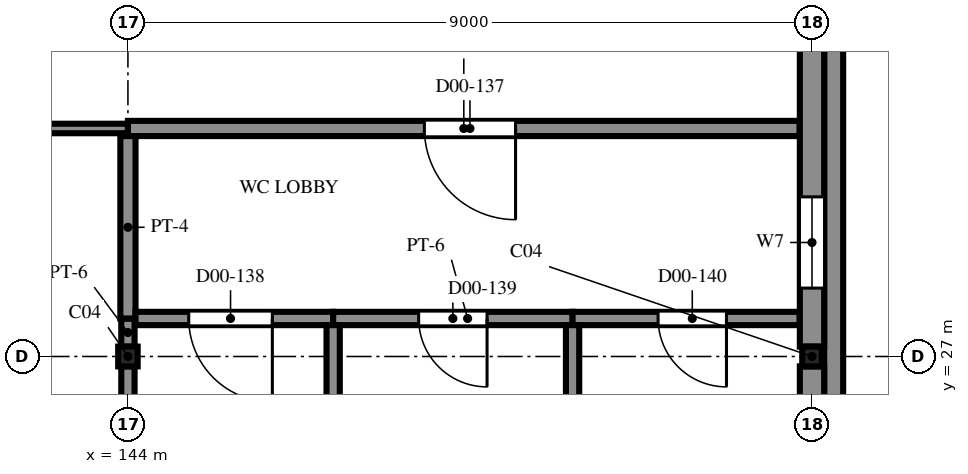
"""IFC4 building model, lengths in metres.
Left out: names, types, materials, properties, quantities, classifications, styles, units other than length and angle.
Written with IfcOpenShell. Run it as: python <this file> out.ifc"""

import sys

from ifc_helpers import new_model, si_unit, direction, frame, frame_2d, origin, origin_2d, place, context, subcontext, project, spatial, polyline, rectangle, i_section, outline, extrude, element, fill, save


model = new_model("IFC4")
c1 = context("Model", 3, precision=1e-05, world=origin(), true_north=direction((0.0, 1.0)))
c2 = subcontext(c1, "Body", "Model", "MODEL_VIEW")
j1 = project(units=[si_unit("LENGTHUNIT", "METRE"), si_unit("PLANEANGLEUNIT", "RADIAN")], contexts=[c1])
p1 = place(None, origin())
s1 = spatial("IfcSite", under=j1, at=p1, CompositionType="ELEMENT")
p2 = place(p1, origin())
s2 = spatial("IfcBuilding", under=s1, at=p2, CompositionType="ELEMENT")
p3 = place(p2, origin())
s3 = spatial("IfcBuildingStorey", under=s2, at=p3, CompositionType="ELEMENT", Elevation=0.0)
for number, where, z_axis, x_axis in (
    (1, (144.0, 27.0, -2.1), (0.0, 0.0, 1.0), (1.0, 0.0, 0.0)),
    (2, (153.0, 27.0, -2.1), (0.0, 0.0, 1.0), (1.0, 0.0, 0.0)),
):
    element("IfcColumn", number, at=place(p3, frame(where, z_axis=z_axis, x_axis=x_axis)), inside=s3, PredefinedType="COLUMN", context=c2, shape_type="SweptSolid", body=[
        extrude(i_section(OverallWidth=0.256, OverallDepth=0.26, WebThickness=0.01, FlangeThickness=0.017, FilletRadius=0.013, at=origin_2d()), origin(), (0.0, 0.0, 1.0), 9.6),
    ])
p4 = place(p3, frame((153.0, 18.13, 0.0), z_axis=(0.0, 0.0, 1.0), x_axis=(0.0, 1.0, 0.0)))
e3 = element("IfcWall", 3, at=p4, inside=s3, PredefinedType="SOLIDWALL", context=c2, shape_type="SweptSolid", body=[
    extrude(rectangle(XDim=8.74, YDim=0.32, at=frame_2d((4.37, 0.0))), origin(), (0.0, 0.0, 1.0), 6.767),
])
p5 = place(p4, frame((0.77, 0.0, 0.9)))
e4 = element("IfcOpeningElement", 4, at=p5, cuts=e3, PredefinedType="OPENING", context=c2, shape_type="SweptSolid", body=[
    extrude(rectangle(XDim=1.2, YDim=2.7, at=frame_2d((0.6, 1.35))), frame((0.0, 0.17, 0.0), z_axis=(0.0, -1.0, 0.0), x_axis=(1.0, 0.0, 0.0)), (0.0, 0.0, 1.0), 0.34),
])
p6 = place(p4, frame((3.77, 0.0, 0.9)))
e5 = element("IfcOpeningElement", 5, at=p6, cuts=e3, PredefinedType="OPENING", context=c2, shape_type="SweptSolid", body=[
    extrude(rectangle(XDim=1.2, YDim=2.7, at=frame_2d((0.6, 1.35))), frame((0.0, 0.17, 0.0), z_axis=(0.0, -1.0, 0.0), x_axis=(1.0, 0.0, 0.0)), (0.0, 0.0, 1.0), 0.34),
])
p7 = place(p4, frame((6.77, 0.0, 0.9)))
e6 = element("IfcOpeningElement", 6, at=p7, cuts=e3, PredefinedType="OPENING", context=c2, shape_type="SweptSolid", body=[
    extrude(rectangle(XDim=1.2, YDim=2.7, at=frame_2d((0.6, 1.35))), frame((0.0, 0.17, 0.0), z_axis=(0.0, -1.0, 0.0), x_axis=(1.0, 0.0, 0.0)), (0.0, 0.0, 1.0), 0.34),
])
p8 = place(p3, frame((153.0, 27.13, 0.0), z_axis=(0.0, 0.0, 1.0), x_axis=(0.0, 1.0, 0.0)))
e7 = element("IfcWall", 7, at=p8, inside=s3, PredefinedType="SOLIDWALL", context=c2, shape_type="SweptSolid", body=[
    extrude(rectangle(XDim=8.616, YDim=0.32, at=frame_2d((4.308, 0.0))), origin(), (0.0, 0.0, 1.0), 6.767),
])
p9 = place(p8, frame((4.97, 0.0, 0.0)))
e8 = element("IfcOpeningElement", 8, at=p9, cuts=e7, PredefinedType="OPENING", context=c2, shape_type="SweptSolid", body=[
    extrude(rectangle(XDim=1.8, YDim=2.1, at=frame_2d((0.9, 1.05))), frame((0.0, 0.17, 0.0), z_axis=(0.0, -1.0, 0.0), x_axis=(1.0, 0.0, 0.0)), (0.0, 0.0, 1.0), 0.34),
])
p10 = place(p8, frame((5.27, 0.0, 2.55)))
e9 = element("IfcOpeningElement", 9, at=p10, cuts=e7, PredefinedType="OPENING", context=c2, shape_type="SweptSolid", body=[
    extrude(rectangle(XDim=1.2, YDim=0.6, at=frame_2d((0.6, 0.3))), frame((0.0, 0.17, 0.0), z_axis=(0.0, -1.0, 0.0), x_axis=(1.0, 0.0, 0.0)), (0.0, 0.0, 1.0), 0.34),
])
p11 = place(p8, frame((0.77, 0.0, 0.9)))
e10 = element("IfcOpeningElement", 10, at=p11, cuts=e7, PredefinedType="OPENING", context=c2, shape_type="SweptSolid", body=[
    extrude(rectangle(XDim=1.2, YDim=2.7, at=frame_2d((0.6, 1.35))), frame((0.0, 0.17, 0.0), z_axis=(0.0, -1.0, 0.0), x_axis=(1.0, 0.0, 0.0)), (0.0, 0.0, 1.0), 0.34),
])
p12 = place(p3, frame((153.285, 8.73, 0.0), z_axis=(0.0, 0.0, 1.0), x_axis=(0.0, 1.0, 0.0)))
e11 = element("IfcWall", 11, at=p12, inside=s3, PredefinedType="SOLIDWALL", context=c2, shape_type="SweptSolid", body=[
    extrude(outline(polyline([(0.0, 0.0), (23.22, 0.0), (23.22, 6.767), (0.0, 6.767), (0.0, 0.0)]), holes=[polyline([(1.05, 3.852), (1.17, 4.068), (1.275, 4.122), (1.365, 4.266), (1.56, 4.41), (1.77, 4.5), (1.98, 4.41), (2.175, 4.266), (2.265, 4.122), (2.37, 4.068), (2.49, 3.852), (2.52, 3.6), (2.52, 0.75), (1.02, 0.75), (1.02, 3.6), (1.05, 3.852)]), polyline([(4.17, 4.068), (4.275, 4.122), (4.365, 4.266), (4.56, 4.41), (4.77, 4.5), (4.98, 4.41), (5.175, 4.266), (5.265, 4.122), (5.37, 4.068), (5.49, 3.852), (5.52, 3.6), (5.52, 0.75), (4.02, 0.75), (4.02, 3.6), (4.05, 3.852), (4.17, 4.068)]), polyline([(7.17, 4.068), (7.275, 4.122), (7.365, 4.266), (7.56, 4.41), (7.77, 4.5), (7.98, 4.41), (8.175, 4.266), (8.265, 4.122), (8.37, 4.068), (8.49, 3.852), (8.52, 3.6), (8.52, 0.75), (7.02, 0.75), (7.02, 3.6), (7.05, 3.852), (7.17, 4.068)]), polyline([(10.17, 4.068), (10.275, 4.122), (10.365, 4.266), (10.56, 4.41), (10.77, 4.5), (10.98, 4.41), (11.175, 4.266), (11.265, 4.122), (11.37, 4.068), (11.49, 3.852), (11.52, 3.6), (11.52, 0.75), (10.02, 0.75), (10.02, 3.6), (10.05, 3.852), (10.17, 4.068)]), polyline([(13.17, 4.068), (13.275, 4.122), (13.365, 4.266), (13.56, 4.41), (13.77, 4.5), (13.98, 4.41), (14.175, 4.266), (14.265, 4.122), (14.37, 4.068), (14.49, 3.852), (14.52, 3.6), (14.52, 0.75), (13.02, 0.75), (13.02, 3.6), (13.05, 3.852), (13.17, 4.068)]), polyline([(16.17, 4.068), (16.275, 4.122), (16.365, 4.266), (16.56, 4.41), (16.77, 4.5), (16.98, 4.41), (17.175, 4.266), (17.265, 4.122), (17.37, 4.068), (17.49, 3.852), (17.52, 3.6), (17.52, 0.75), (16.02, 0.75), (16.02, 3.6), (16.05, 3.852), (16.17, 4.068)]), polyline([(19.17, 4.068), (19.275, 4.122), (19.365, 4.266), (19.56, 4.41), (19.77, 4.5), (19.98, 4.41), (20.175, 4.266), (20.265, 4.122), (20.37, 4.068), (20.49, 3.852), (20.52, 3.6), (20.52, 0.75), (19.02, 0.75), (19.02, 3.6), (19.05, 3.852), (19.17, 4.068)])]), frame((0.0, 0.125, 0.0), z_axis=(0.0, -1.0, 0.0), x_axis=(1.0, 0.0, 0.0)), (0.0, 0.0, 1.0), 0.25),
])
p13 = place(p3, frame((144.0, 30.0, 0.0), z_axis=(0.0, 0.0, 1.0), x_axis=(-1.0, 0.0, 0.0)))
e12 = element("IfcWall", 12, at=p13, inside=s3, PredefinedType="PARTITIONING", context=c2, shape_type="SweptSolid", body=[
    extrude(rectangle(XDim=9.0, YDim=0.125, at=frame_2d((4.5, 0.0))), origin(), (0.0, 0.0, 1.0), 6.757),
])
p14 = place(p13, frame((3.5, 0.0, 0.0)))
e13 = element("IfcOpeningElement", 13, at=p14, cuts=e12, PredefinedType="OPENING", context=c2, shape_type="SweptSolid", body=[
    extrude(rectangle(XDim=2.0, YDim=2.4, at=frame_2d((1.0, 1.2))), frame((0.0, 0.073, 0.0), z_axis=(0.0, -1.0, 0.0), x_axis=(1.0, 0.0, 0.0)), (0.0, 0.0, 1.0), 0.145),
])
p15 = place(p3, frame((152.838, 30.0, 0.0), z_axis=(0.0, 0.0, 1.0), x_axis=(-1.0, 0.0, 0.0)))
e14 = element("IfcWall", 14, at=p15, inside=s3, PredefinedType="PARTITIONING", context=c2, shape_type="SweptSolid", body=[
    extrude(rectangle(XDim=8.838, YDim=0.2, at=frame_2d((4.419, 0.0))), origin(), (0.0, 0.0, 1.0), 6.6),
])
p16 = place(p15, frame((3.738, 0.0, 0.0)))
e15 = element("IfcOpeningElement", 15, at=p16, cuts=e14, PredefinedType="OPENING", context=c2, shape_type="SweptSolid", body=[
    extrude(rectangle(XDim=1.2, YDim=2.1, at=frame_2d((0.6, 1.05))), frame((0.0, 0.11, 0.0), z_axis=(0.0, -1.0, 0.0), x_axis=(1.0, 0.0, 0.0)), (0.0, 0.0, 1.0), 0.22),
])
p17 = place(p3, frame((144.0, 27.5, 0.0), z_axis=(0.0, 0.0, 1.0), x_axis=(0.0, -1.0, 0.0)))
e16 = element("IfcWall", 16, at=p17, inside=s3, PredefinedType="PARTITIONING", context=c2, shape_type="SweptSolid", body=[
    extrude(rectangle(XDim=0.37, YDim=0.175, at=frame_2d((0.185, 0.0))), origin(), (0.0, 0.0, 1.0), 6.459),
])
p18 = place(p3, frame((144.0, 26.87, 0.0), z_axis=(0.0, 0.0, 1.0), x_axis=(0.0, -1.0, 0.0)))
e17 = element("IfcWall", 17, at=p18, inside=s3, PredefinedType="PARTITIONING", context=c2, shape_type="SweptSolid", body=[
    extrude(rectangle(XDim=5.782, YDim=0.175, at=frame_2d((2.891, 0.0))), origin(), (0.0, 0.0, 1.0), 6.459),
])
p19 = place(p3, frame((144.0, 29.9, 0.0), z_axis=(0.0, 0.0, 1.0), x_axis=(0.0, -1.0, 0.0)))
e18 = element("IfcWall", 18, at=p19, inside=s3, PredefinedType="PARTITIONING", context=c2, shape_type="SweptSolid", body=[
    extrude(rectangle(XDim=2.4, YDim=0.2, at=frame_2d((1.2, 0.0))), origin(), (0.0, 0.0, 1.0), 6.6),
])
p20 = place(p3, frame((146.7, 27.5, 0.0), z_axis=(0.0, 0.0, 1.0), x_axis=(-1.0, 0.0, 0.0)))
e19 = element("IfcWall", 19, at=p20, inside=s3, PredefinedType="PARTITIONING", context=c2, shape_type="SweptSolid", body=[
    extrude(rectangle(XDim=2.6, YDim=0.175, at=frame_2d((1.3, 0.0))), origin(), (0.0, 0.0, 1.0), 6.459),
])
p21 = place(p20, frame((0.8, 0.0, 0.0)))
e20 = element("IfcOpeningElement", 20, at=p21, cuts=e19, PredefinedType="OPENING", context=c2, shape_type="SweptSolid", body=[
    extrude(rectangle(XDim=1.1, YDim=2.1, at=frame_2d((0.55, 1.05))), frame((0.0, 0.097, 0.0), z_axis=(0.0, -1.0, 0.0), x_axis=(1.0, 0.0, 0.0)), (0.0, 0.0, 1.0), 0.195),
])
p22 = place(p3, frame((149.85, 27.5, 0.0), z_axis=(0.0, 0.0, 1.0), x_axis=(-1.0, 0.0, 0.0)))
e21 = element("IfcWall", 21, at=p22, inside=s3, PredefinedType="PARTITIONING", context=c2, shape_type="SweptSolid", body=[
    extrude(rectangle(XDim=3.15, YDim=0.175, at=frame_2d((1.575, 0.0))), origin(), (0.0, 0.0, 1.0), 6.459),
])
p23 = place(p22, frame((1.125, 0.0, 0.0)))
e22 = element("IfcOpeningElement", 22, at=p23, cuts=e21, PredefinedType="OPENING", context=c2, shape_type="SweptSolid", body=[
    extrude(rectangle(XDim=0.9, YDim=2.1, at=frame_2d((0.45, 1.05))), frame((0.0, 0.097, 0.0), z_axis=(0.0, -1.0, 0.0), x_axis=(1.0, 0.0, 0.0)), (0.0, 0.0, 1.0), 0.195),
])
p24 = place(p3, frame((152.838, 27.5, 0.0), z_axis=(0.0, 0.0, 1.0), x_axis=(-1.0, 0.0, 0.0)))
e23 = element("IfcWall", 23, at=p24, inside=s3, PredefinedType="PARTITIONING", context=c2, shape_type="SweptSolid", body=[
    extrude(rectangle(XDim=2.988, YDim=0.175, at=frame_2d((1.494, 0.0))), origin(), (0.0, 0.0, 1.0), 6.459),
])
p25 = place(p24, frame((0.963, 0.0, 0.0)))
e24 = element("IfcOpeningElement", 24, at=p25, cuts=e23, PredefinedType="OPENING", context=c2, shape_type="SweptSolid", body=[
    extrude(rectangle(XDim=0.9, YDim=2.1, at=frame_2d((0.45, 1.05))), frame((0.0, 0.097, 0.0), z_axis=(0.0, -1.0, 0.0), x_axis=(1.0, 0.0, 0.0)), (0.0, 0.0, 1.0), 0.195),
])
for number, where, z_axis, x_axis in (
    (25, (146.7, 27.413, 0.0), (0.0, 0.0, 1.0), (0.0, -1.0, 0.0)),
    (26, (149.85, 27.413, 0.0), (0.0, 0.0, 1.0), (0.0, -1.0, 0.0)),
):
    element("IfcWall", number, at=place(p3, frame(where, z_axis=z_axis, x_axis=x_axis)), inside=s3, PredefinedType="PARTITIONING", context=c2, shape_type="SweptSolid", body=[
        extrude(rectangle(XDim=6.325, YDim=0.175, at=frame_2d((3.163, 0.0))), origin(), (0.0, 0.0, 1.0), 6.459),
    ])
p26 = place(p11, origin())
e27 = element("IfcWindow", 27, at=p26, inside=s3, PartitioningType="DOUBLE_PANEL_HORIZONTAL", PredefinedType="WINDOW", context=c2, shape_type="SweptSolid", body=[
    extrude(outline(polyline([(0.0, 0.0), (1.2, 0.0), (1.2, 1.97), (1.195, 2.055), (1.18, 2.139), (1.156, 2.221), (1.123, 2.299), (1.081, 2.374), (1.031, 2.442), (0.973, 2.505), (0.908, 2.561), (0.838, 2.609), (0.762, 2.648), (0.683, 2.679), (0.6, 2.7), (0.517, 2.679), (0.438, 2.648), (0.362, 2.609), (0.292, 2.561), (0.227, 2.505), (0.169, 2.442), (0.119, 2.374), (0.077, 2.299), (0.044, 2.221), (0.02, 2.139), (0.005, 2.055), (0.0, 1.97), (0.0, 0.0)]), holes=[polyline([(0.07, 0.07), (1.13, 0.07), (1.13, 1.97), (1.125, 2.046), (1.113, 2.121), (1.092, 2.194), (1.062, 2.265), (1.025, 2.331), (0.981, 2.393), (0.93, 2.45), (0.873, 2.5), (0.811, 2.544), (0.744, 2.581), (0.673, 2.609), (0.6, 2.63), (0.527, 2.609), (0.456, 2.581), (0.389, 2.544), (0.327, 2.5), (0.27, 2.45), (0.219, 2.393), (0.175, 2.331), (0.138, 2.265), (0.108, 2.194), (0.087, 2.121), (0.074, 2.046), (0.07, 1.97), (0.07, 0.07)])]), frame((0.0, 0.03, 0.0), z_axis=(0.0, -1.0, 0.0), x_axis=(1.0, 0.0, 0.0)), (0.0, 0.0, 1.0), 0.06),
    extrude(outline(polyline([(0.0, 1.97), (0.005, 2.055), (0.02, 2.139), (0.044, 2.221), (0.077, 2.299), (0.119, 2.374), (0.169, 2.442), (0.227, 2.505), (0.292, 2.561), (0.362, 2.609), (0.438, 2.648), (0.517, 2.679), (0.6, 2.7), (0.0, 2.7), (0.0, 1.97)])), frame((0.0, 0.028, 0.0), z_axis=(0.0, -1.0, 0.0), x_axis=(1.0, 0.0, 0.0)), (0.0, 0.0, 1.0), 0.056),
    extrude(outline(polyline([(0.6, 2.7), (0.683, 2.679), (0.762, 2.648), (0.838, 2.609), (0.908, 2.561), (0.973, 2.505), (1.031, 2.442), (1.081, 2.374), (1.123, 2.299), (1.156, 2.221), (1.18, 2.139), (1.195, 2.055), (1.2, 1.97), (1.2, 2.7), (0.6, 2.7)])), frame((0.0, 0.027, 0.0), z_axis=(0.0, -1.0, 0.0), x_axis=(1.0, 0.0, 0.0)), (0.0, 0.0, 1.0), 0.054),
    extrude(outline(polyline([(1.128, 2.01), (0.072, 2.01), (0.07, 1.97), (0.07, 1.93), (1.13, 1.93), (1.13, 1.97), (1.128, 2.01)])), frame((0.0, 0.021, 0.0), z_axis=(0.0, -1.0, 0.0), x_axis=(1.0, 0.0, 0.0)), (0.0, 0.0, 1.0), 0.042),
    extrude(rectangle(XDim=1.06, YDim=0.04, at=frame_2d((0.6, 1.0))), frame((0.0, 0.021, 0.0), z_axis=(0.0, -1.0, 0.0), x_axis=(1.0, 0.0, 0.0)), (0.0, 0.0, 1.0), 0.043),
    extrude(outline(polyline([(0.07, 0.07), (1.13, 0.07), (1.13, 0.98), (0.07, 0.98), (0.07, 0.07)]), holes=[polyline([(0.1, 0.1), (1.1, 0.1), (1.1, 0.95), (0.1, 0.95), (0.1, 0.1)])]), frame((0.0, 0.022, 0.0), z_axis=(0.0, -1.0, 0.0), x_axis=(1.0, 0.0, 0.0)), (0.0, 0.0, 1.0), 0.045),
    extrude(rectangle(XDim=1.0, YDim=0.85, at=frame_2d((0.6, 0.525))), frame((0.0, 0.006, 0.0), z_axis=(0.0, -1.0, 0.0), x_axis=(1.0, 0.0, 0.0)), (0.0, 0.0, 1.0), 0.012),
    extrude(outline(polyline([(0.07, 1.02), (1.13, 1.02), (1.13, 1.93), (0.07, 1.93), (0.07, 1.02)]), holes=[polyline([(0.1, 1.05), (1.1, 1.05), (1.1, 1.9), (0.1, 1.9), (0.1, 1.05)])]), frame((0.0, 0.022, 0.0), z_axis=(0.0, -1.0, 0.0), x_axis=(1.0, 0.0, 0.0)), (0.0, 0.0, 1.0), 0.045),
    extrude(rectangle(XDim=1.0, YDim=0.85, at=frame_2d((0.6, 1.475))), frame((0.0, 0.006, 0.0), z_axis=(0.0, -1.0, 0.0), x_axis=(1.0, 0.0, 0.0)), (0.0, 0.0, 1.0), 0.012),
    extrude(outline(polyline([(0.072, 2.01), (1.128, 2.01), (1.125, 2.046), (1.113, 2.121), (1.092, 2.194), (1.062, 2.265), (1.025, 2.331), (0.981, 2.393), (0.93, 2.45), (0.873, 2.5), (0.811, 2.544), (0.744, 2.581), (0.673, 2.609), (0.6, 2.63), (0.527, 2.609), (0.456, 2.581), (0.389, 2.544), (0.327, 2.5), (0.27, 2.45), (0.219, 2.393), (0.175, 2.331), (0.138, 2.265), (0.108, 2.194), (0.087, 2.121), (0.074, 2.046), (0.072, 2.01)]), holes=[polyline([(0.11, 2.045), (0.121, 2.113), (0.141, 2.183), (0.169, 2.249), (0.204, 2.312), (0.246, 2.371), (0.295, 2.425), (0.349, 2.473), (0.408, 2.514), (0.471, 2.549), (0.538, 2.576), (0.6, 2.594), (0.662, 2.576), (0.729, 2.549), (0.792, 2.514), (0.851, 2.473), (0.905, 2.425), (0.954, 2.371), (0.996, 2.312), (1.031, 2.249), (1.059, 2.183), (1.079, 2.113), (1.09, 2.045), (0.11, 2.045)])]), frame((0.0, 0.022, 0.0), z_axis=(0.0, -1.0, 0.0), x_axis=(1.0, 0.0, 0.0)), (0.0, 0.0, 1.0), 0.045),
    extrude(outline(polyline([(1.09, 2.045), (1.079, 2.113), (1.059, 2.183), (1.031, 2.249), (0.996, 2.312), (0.954, 2.371), (0.905, 2.425), (0.851, 2.473), (0.792, 2.514), (0.729, 2.549), (0.662, 2.576), (0.6, 2.594), (0.538, 2.576), (0.471, 2.549), (0.408, 2.514), (0.349, 2.473), (0.295, 2.425), (0.246, 2.371), (0.204, 2.312), (0.169, 2.249), (0.141, 2.183), (0.121, 2.113), (0.11, 2.045), (1.09, 2.045)])), frame((0.0, 0.006, 0.0), z_axis=(0.0, -1.0, 0.0), x_axis=(1.0, 0.0, 0.0)), (0.0, 0.0, 1.0), 0.012),
])
fill(e10, e27)
p27 = place(p16, origin())
e28 = element("IfcDoor", 28, at=p27, inside=s3, OperationType="DOUBLE_DOOR_SINGLE_SWING", PredefinedType="DOOR", context=c2, shape_type="SweptSolid", body=[
    extrude(outline(polyline([(0.0, 0.0), (0.07, 0.0), (0.07, 2.03), (1.13, 2.03), (1.13, 0.0), (1.2, 0.0), (1.2, 2.1), (0.0, 2.1), (0.0, 0.0)])), frame((0.0, 0.025, 0.0), z_axis=(0.0, -1.0, 0.0), x_axis=(1.0, 0.0, 0.0)), (0.0, 0.0, 1.0), 0.05),
    extrude(outline(polyline([(0.074, 0.01), (0.597, 0.01), (0.597, 2.026), (0.074, 2.026), (0.074, 0.01)]), holes=[polyline([(0.178, 0.373), (0.492, 0.373), (0.492, 1.784), (0.178, 1.784), (0.178, 0.373)])]), frame((0.0, 0.017, 0.0), z_axis=(0.0, -1.0, 0.0), x_axis=(1.0, 0.0, 0.0)), (0.0, 0.0, 1.0), 0.035),
    extrude(rectangle(XDim=0.314, YDim=1.411, at=frame_2d((0.335, 1.079))), frame((0.0, 0.009, 0.0), z_axis=(0.0, -1.0, 0.0), x_axis=(1.0, 0.0, 0.0)), (0.0, 0.0, 1.0), 0.017),
    extrude(outline(polyline([(0.603, 0.01), (1.126, 0.01), (1.126, 2.026), (0.603, 2.026), (0.603, 0.01)]), holes=[polyline([(0.708, 0.373), (1.021, 0.373), (1.021, 1.784), (0.708, 1.784), (0.708, 0.373)])]), frame((0.0, 0.017, 0.0), z_axis=(0.0, -1.0, 0.0), x_axis=(1.0, 0.0, 0.0)), (0.0, 0.0, 1.0), 0.035),
    extrude(rectangle(XDim=0.314, YDim=1.411, at=frame_2d((0.865, 1.079))), frame((0.0, 0.009, 0.0), z_axis=(0.0, -1.0, 0.0), x_axis=(1.0, 0.0, 0.0)), (0.0, 0.0, 1.0), 0.017),
])
fill(e15, e28)
p28 = place(p21, origin())
e29 = element("IfcDoor", 29, at=p28, inside=s3, OperationType="SINGLE_SWING_LEFT", PredefinedType="DOOR", context=c2, shape_type="SweptSolid", body=[
    extrude(outline(polyline([(0.0, 0.0), (0.07, 0.0), (0.07, 2.03), (1.03, 2.03), (1.03, 0.0), (1.1, 0.0), (1.1, 2.1), (0.0, 2.1), (0.0, 0.0)])), frame((0.0, 0.025, 0.0), z_axis=(0.0, -1.0, 0.0), x_axis=(1.0, 0.0, 0.0)), (0.0, 0.0, 1.0), 0.05),
    extrude(outline(polyline([(0.074, 0.01), (1.026, 0.01), (1.026, 2.026), (0.074, 2.026), (0.074, 0.01)]), holes=[polyline([(0.194, 0.16), (0.906, 0.16), (0.906, 1.01), (0.194, 1.01), (0.194, 0.16)]), polyline([(0.4, 1.16), (0.7, 1.16), (0.7, 1.76), (0.4, 1.76), (0.4, 1.16)])]), frame((0.0, 0.017, 0.0), z_axis=(0.0, -1.0, 0.0), x_axis=(1.0, 0.0, 0.0)), (0.0, 0.0, 1.0), 0.035),
    extrude(rectangle(XDim=0.712, YDim=0.85, at=frame_2d((0.55, 0.585))), frame((0.0, 0.009, 0.0), z_axis=(0.0, -1.0, 0.0), x_axis=(1.0, 0.0, 0.0)), (0.0, 0.0, 1.0), 0.017),
    extrude(rectangle(XDim=0.3, YDim=0.6, at=frame_2d((0.55, 1.46))), frame((0.0, 0.006, 0.0), z_axis=(0.0, -1.0, 0.0), x_axis=(1.0, 0.0, 0.0)), (0.0, 0.0, 1.0), 0.012),
])
fill(e20, e29)
p29 = place(p23, origin())
e30 = element("IfcDoor", 30, at=p29, inside=s3, OperationType="SINGLE_SWING_LEFT", PredefinedType="DOOR", context=c2, shape_type="SweptSolid", body=[
    extrude(outline(polyline([(0.0, 0.0), (0.07, 0.0), (0.07, 2.03), (0.83, 2.03), (0.83, 0.0), (0.9, 0.0), (0.9, 2.1), (0.0, 2.1), (0.0, 0.0)])), frame((0.0, 0.025, 0.0), z_axis=(0.0, -1.0, 0.0), x_axis=(1.0, 0.0, 0.0)), (0.0, 0.0, 1.0), 0.05),
    extrude(outline(polyline([(0.074, 0.01), (0.826, 0.01), (0.826, 2.026), (0.074, 2.026), (0.074, 0.01)]), holes=[polyline([(0.194, 0.16), (0.706, 0.16), (0.706, 1.01), (0.194, 1.01), (0.194, 0.16)]), polyline([(0.3, 1.16), (0.6, 1.16), (0.6, 1.76), (0.3, 1.76), (0.3, 1.16)])]), frame((0.0, 0.017, 0.0), z_axis=(0.0, -1.0, 0.0), x_axis=(1.0, 0.0, 0.0)), (0.0, 0.0, 1.0), 0.035),
    extrude(rectangle(XDim=0.512, YDim=0.85, at=frame_2d((0.45, 0.585))), frame((0.0, 0.009, 0.0), z_axis=(0.0, -1.0, 0.0), x_axis=(1.0, 0.0, 0.0)), (0.0, 0.0, 1.0), 0.017),
    extrude(rectangle(XDim=0.3, YDim=0.6, at=frame_2d((0.45, 1.46))), frame((0.0, 0.006, 0.0), z_axis=(0.0, -1.0, 0.0), x_axis=(1.0, 0.0, 0.0)), (0.0, 0.0, 1.0), 0.012),
])
fill(e22, e30)
p30 = place(p25, origin())
e31 = element("IfcDoor", 31, at=p30, inside=s3, OperationType="SINGLE_SWING_LEFT", PredefinedType="DOOR", context=c2, shape_type="SweptSolid", body=[
    extrude(outline(polyline([(0.0, 0.0), (0.07, 0.0), (0.07, 2.03), (0.83, 2.03), (0.83, 0.0), (0.9, 0.0), (0.9, 2.1), (0.0, 2.1), (0.0, 0.0)])), frame((0.0, 0.025, 0.0), z_axis=(0.0, -1.0, 0.0), x_axis=(1.0, 0.0, 0.0)), (0.0, 0.0, 1.0), 0.05),
    extrude(outline(polyline([(0.074, 0.01), (0.826, 0.01), (0.826, 2.026), (0.074, 2.026), (0.074, 0.01)]), holes=[polyline([(0.194, 0.16), (0.706, 0.16), (0.706, 1.01), (0.194, 1.01), (0.194, 0.16)]), polyline([(0.3, 1.16), (0.6, 1.16), (0.6, 1.76), (0.3, 1.76), (0.3, 1.16)])]), frame((0.0, 0.017, 0.0), z_axis=(0.0, -1.0, 0.0), x_axis=(1.0, 0.0, 0.0)), (0.0, 0.0, 1.0), 0.035),
    extrude(rectangle(XDim=0.512, YDim=0.85, at=frame_2d((0.45, 0.585))), frame((0.0, 0.009, 0.0), z_axis=(0.0, -1.0, 0.0), x_axis=(1.0, 0.0, 0.0)), (0.0, 0.0, 1.0), 0.017),
    extrude(rectangle(XDim=0.3, YDim=0.6, at=frame_2d((0.45, 1.46))), frame((0.0, 0.006, 0.0), z_axis=(0.0, -1.0, 0.0), x_axis=(1.0, 0.0, 0.0)), (0.0, 0.0, 1.0), 0.012),
])
fill(e24, e31)
save(model, sys.argv[1])
